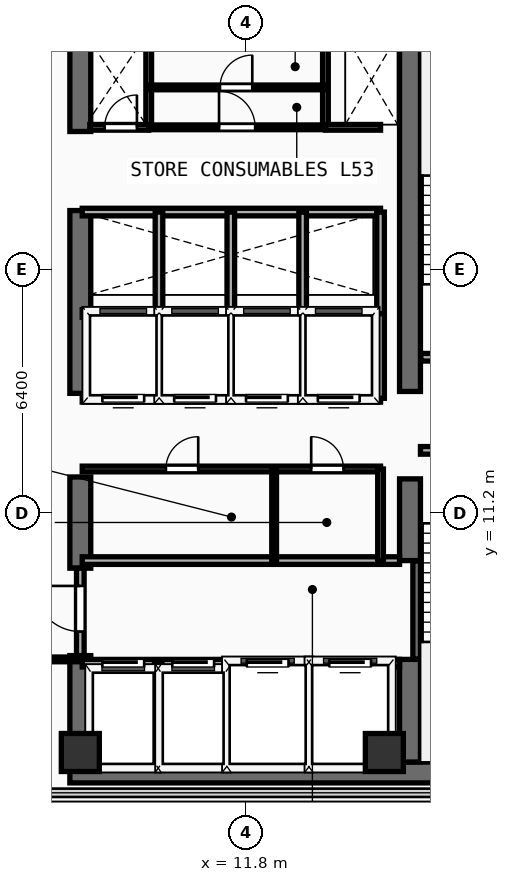
"""IFC4 building model, lengths in metres.
Left out: names, types, materials, properties, quantities, classifications, styles, units other than length and angle.
Written with IfcOpenShell. Run it as: python <this file> out.ifc"""

import sys

from ifc_helpers import new_model, si_unit, direction, frame, frame_2d, origin, origin_2d, place, context, subcontext, project, spatial, rectangle, extrude, element, fill, save


model = new_model("IFC4")
c1 = context("Model", 3, precision=1e-05, world=origin(), true_north=direction((0.0, 1.0)))
c2 = subcontext(c1, "Body", "Model", "MODEL_VIEW")
j1 = project(units=[si_unit("LENGTHUNIT", "METRE"), si_unit("PLANEANGLEUNIT", "RADIAN")], contexts=[c1])
p1 = place(None, origin())
s1 = spatial("IfcSite", under=j1, at=p1, CompositionType="ELEMENT")
p2 = place(p1, origin())
s2 = spatial("IfcBuilding", under=s1, at=p2, CompositionType="ELEMENT")
p3 = place(p2, frame((0.0, 0.0, 208.3)))
s3 = spatial("IfcBuildingStorey", under=s2, at=p3, CompositionType="ELEMENT", Elevation=208.3)
p4 = place(p3, frame((7.175, 4.375, 0.0), z_axis=(0.0, 0.0, 1.0), x_axis=(1.0, 0.0, 0.0)))
e1 = element("IfcWall", 1, at=p4, inside=s3, PredefinedType="SHEAR", context=c2, shape_type="SweptSolid", body=[
    extrude(rectangle(XDim=13.9, YDim=0.55, at=frame_2d((6.95, 0.0))), origin(), (0.0, 0.0, 1.0), 3.56),
])
p5 = place(p3, frame((7.45, 4.65, 0.0), z_axis=(0.0, 0.0, 1.0), x_axis=(0.0, 1.0, 0.0)))
e2 = element("IfcWall", 2, at=p5, inside=s3, PredefinedType="SHEAR", context=c2, shape_type="SweptSolid", body=[
    extrude(rectangle(XDim=2.8, YDim=0.55, at=frame_2d((1.4, 0.0))), origin(), (0.0, 0.0, 1.0), 3.56),
])
p6 = place(p3, frame((7.45, 9.75, 0.0), z_axis=(0.0, 0.0, 1.0), x_axis=(0.0, 1.0, 0.0)))
e3 = element("IfcWall", 3, at=p6, inside=s3, PredefinedType="SHEAR", context=c2, shape_type="SweptSolid", body=[
    extrude(rectangle(XDim=2.4, YDim=0.55, at=frame_2d((1.2, 0.0))), origin(), (0.0, 0.0, 1.0), 3.56),
])
p7 = place(p3, frame((7.45, 14.35, 0.0), z_axis=(0.0, 0.0, 1.0), x_axis=(0.0, 1.0, 0.0)))
e4 = element("IfcWall", 4, at=p7, inside=s3, PredefinedType="SHEAR", context=c2, shape_type="SweptSolid", body=[
    extrude(rectangle(XDim=4.81, YDim=0.55, at=frame_2d((2.405, 0.0))), origin(), (0.0, 0.0, 1.0), 3.56),
])
p8 = place(p3, frame((7.45, 21.24, 0.0), z_axis=(0.0, 0.0, 1.0), x_axis=(0.0, 1.0, 0.0)))
e5 = element("IfcWall", 5, at=p8, inside=s3, PredefinedType="SHEAR", context=c2, shape_type="SweptSolid", body=[
    extrude(rectangle(XDim=2.26, YDim=0.55, at=frame_2d((1.13, 0.0))), origin(), (0.0, 0.0, 1.0), 3.56),
])
p9 = place(p3, frame((16.125, 4.65, 0.0), z_axis=(0.0, 0.0, 1.0), x_axis=(0.0, 1.0, 0.0)))
e6 = element("IfcWall", 6, at=p9, inside=s3, PredefinedType="SHEAR", context=c2, shape_type="SweptSolid", body=[
    extrude(rectangle(XDim=2.7, YDim=0.55, at=frame_2d((1.35, 0.0))), origin(), (0.0, 0.0, 1.0), 3.56),
])
p10 = place(p3, frame((16.125, 9.95, 0.0), z_axis=(0.0, 0.0, 1.0), x_axis=(0.0, 1.0, 0.0)))
e7 = element("IfcWall", 7, at=p10, inside=s3, PredefinedType="SHEAR", context=c2, shape_type="SweptSolid", body=[
    extrude(rectangle(XDim=2.15, YDim=0.55, at=frame_2d((1.075, 0.0))), origin(), (0.0, 0.0, 1.0), 3.56),
])
p11 = place(p3, frame((16.125, 14.4, 0.0), z_axis=(0.0, 0.0, 1.0), x_axis=(0.0, 1.0, 0.0)))
e8 = element("IfcWall", 8, at=p11, inside=s3, PredefinedType="SHEAR", context=c2, shape_type="SweptSolid", body=[
    extrude(rectangle(XDim=9.1, YDim=0.55, at=frame_2d((4.55, 0.0))), origin(), (0.0, 0.0, 1.0), 3.56),
])
for number, where, z_axis, x_axis in (
    (9, (7.45, 4.9, 0.0), (0.0, 0.0, 1.0), (1.0, 0.0, 0.0)),
    (10, (15.45, 4.9, 0.0), (0.0, 0.0, 1.0), (1.0, 0.0, 0.0)),
):
    element("IfcColumn", number, at=place(p3, frame(where, z_axis=z_axis, x_axis=x_axis)), inside=s3, PredefinedType="COLUMN", context=c2, shape_type="SweptSolid", body=[
        extrude(rectangle(XDim=1.0, YDim=1.0, at=origin_2d()), origin(), (0.0, 0.0, 1.0), 3.56),
    ])
p12 = place(p3, frame((16.3, 7.36, 0.0), z_axis=(0.0, 0.0, 1.0), x_axis=(0.0, 1.0, 0.0)))
e11 = element("IfcWall", 11, at=p12, inside=s3, PredefinedType="SHEAR", context=c2, shape_type="SweptSolid", body=[
    extrude(rectangle(XDim=2.58, YDim=0.2, at=frame_2d((1.29, 0.0))), origin(), (0.0, 0.0, 1.0), 3.56),
])
p13 = place(p3, frame((16.4, 12.85, 0.0), z_axis=(0.0, 0.0, 1.0), x_axis=(1.0, 0.0, 0.0)))
e12 = element("IfcWall", 12, at=p13, inside=s3, PredefinedType="PARTITIONING", context=c2, shape_type="SweptSolid", body=[
    extrude(rectangle(XDim=3.96, YDim=0.2, at=frame_2d((1.98, 0.0))), origin(), (0.0, 0.0, 1.0), 3.56),
])
p14 = place(p13, frame((1.304, 0.0, 0.0)))
e13 = element("IfcOpeningElement", 13, at=p14, cuts=e12, PredefinedType="OPENING", context=c2, shape_type="SweptSolid", body=[
    extrude(rectangle(XDim=1.1, YDim=2.2, at=frame_2d((0.55, 1.1))), frame((0.0, 0.11, 0.0), z_axis=(0.0, -1.0, 0.0), x_axis=(1.0, 0.0, 0.0)), (0.0, 0.0, 1.0), 0.22),
])
p15 = place(p3, frame((16.41, 15.3, 0.0), z_axis=(0.0, 0.0, 1.0), x_axis=(1.0, 0.0, 0.0)))
e14 = element("IfcWall", 14, at=p15, inside=s3, PredefinedType="PARTITIONING", context=c2, shape_type="SweptSolid", body=[
    extrude(rectangle(XDim=3.95, YDim=0.2, at=frame_2d((1.975, 0.0))), origin(), (0.0, 0.0, 1.0), 3.56),
])
p16 = place(p15, frame((1.294, 0.0, 0.0)))
e15 = element("IfcOpeningElement", 15, at=p16, cuts=e14, PredefinedType="OPENING", context=c2, shape_type="SweptSolid", body=[
    extrude(rectangle(XDim=1.1, YDim=2.2, at=frame_2d((0.55, 1.1))), frame((0.0, 0.11, 0.0), z_axis=(0.0, -1.0, 0.0), x_axis=(1.0, 0.0, 0.0)), (0.0, 0.0, 1.0), 0.22),
])
p17 = place(p3, frame((7.5, 7.25, 0.0), z_axis=(0.0, 0.0, 1.0), x_axis=(1.0, 0.0, 0.0)))
e16 = element("IfcWall", 16, at=p17, inside=s3, PredefinedType="PARTITIONING", context=c2, shape_type="SweptSolid", body=[
    extrude(rectangle(XDim=8.35, YDim=0.2, at=frame_2d((4.175, 0.0))), origin(), (0.0, 0.0, 1.0), 3.56),
])
p18 = place(p17, frame((0.53, 0.0, 0.0)))
e17 = element("IfcOpeningElement", 17, at=p18, cuts=e16, PredefinedType="OPENING", context=c2, shape_type="SweptSolid", body=[
    extrude(rectangle(XDim=1.1, YDim=2.2, at=frame_2d((0.55, 1.1))), frame((0.0, 0.11, 0.0), z_axis=(0.0, -1.0, 0.0), x_axis=(1.0, 0.0, 0.0)), (0.0, 0.0, 1.0), 0.22),
])
p19 = place(p17, frame((2.37, 0.0, 0.0)))
e18 = element("IfcOpeningElement", 18, at=p19, cuts=e16, PredefinedType="OPENING", context=c2, shape_type="SweptSolid", body=[
    extrude(rectangle(XDim=1.1, YDim=2.2, at=frame_2d((0.55, 1.1))), frame((0.0, 0.11, 0.0), z_axis=(0.0, -1.0, 0.0), x_axis=(1.0, 0.0, 0.0)), (0.0, 0.0, 1.0), 0.22),
])
p20 = place(p17, frame((4.33, 0.0, 0.0)))
e19 = element("IfcOpeningElement", 19, at=p20, cuts=e16, PredefinedType="OPENING", context=c2, shape_type="SweptSolid", body=[
    extrude(rectangle(XDim=1.1, YDim=2.2, at=frame_2d((0.55, 1.1))), frame((0.0, 0.11, 0.0), z_axis=(0.0, -1.0, 0.0), x_axis=(1.0, 0.0, 0.0)), (0.0, 0.0, 1.0), 0.22),
])
p21 = place(p17, frame((6.5, 0.0, 0.0)))
e20 = element("IfcOpeningElement", 20, at=p21, cuts=e16, PredefinedType="OPENING", context=c2, shape_type="SweptSolid", body=[
    extrude(rectangle(XDim=1.1, YDim=2.2, at=frame_2d((0.55, 1.1))), frame((0.0, 0.11, 0.0), z_axis=(0.0, -1.0, 0.0), x_axis=(1.0, 0.0, 0.0)), (0.0, 0.0, 1.0), 0.22),
])
p22 = place(p3, frame((7.5, 9.95, 0.0), z_axis=(0.0, 0.0, 1.0), x_axis=(1.0, 0.0, 0.0)))
e21 = element("IfcWall", 21, at=p22, inside=s3, PredefinedType="PARTITIONING", context=c2, shape_type="SweptSolid", body=[
    extrude(rectangle(XDim=8.35, YDim=0.2, at=frame_2d((4.175, 0.0))), origin(), (0.0, 0.0, 1.0), 3.56),
])
for number, where, z_axis, x_axis in (
    (22, (9.5, 4.45, 0.0), (0.0, 0.0, 1.0), (0.0, 1.0, 0.0)),
    (23, (11.36, 4.45, 0.0), (0.0, 0.0, 1.0), (0.0, 1.0, 0.0)),
    (24, (13.46, 4.45, 0.0), (0.0, 0.0, 1.0), (0.0, 1.0, 0.0)),
):
    element("IfcWall", number, at=place(p3, frame(where, z_axis=z_axis, x_axis=x_axis)), inside=s3, PredefinedType="PARTITIONING", context=c2, shape_type="SweptSolid", body=[
        extrude(rectangle(XDim=2.8, YDim=0.2, at=frame_2d((1.4, 0.0))), origin(), (0.0, 0.0, 1.0), 3.56),
    ])
p23 = place(p3, frame((7.45, 7.45, 0.0), z_axis=(0.0, 0.0, 1.0), x_axis=(0.0, 1.0, 0.0)))
e25 = element("IfcWall", 25, at=p23, inside=s3, PredefinedType="PARTITIONING", context=c2, shape_type="SweptSolid", body=[
    extrude(rectangle(XDim=2.3, YDim=0.2, at=frame_2d((1.15, 0.0))), origin(), (0.0, 0.0, 1.0), 2.54),
])
p24 = place(p23, frame((0.633, 0.0, 0.0)))
e26 = element("IfcOpeningElement", 26, at=p24, cuts=e25, PredefinedType="OPENING", context=c2, shape_type="SweptSolid", body=[
    extrude(rectangle(XDim=1.2, YDim=2.25, at=frame_2d((0.6, 1.125))), frame((0.0, 0.11, 0.0), z_axis=(0.0, -1.0, 0.0), x_axis=(1.0, 0.0, 0.0)), (0.0, 0.0, 1.0), 0.22),
])
p25 = place(p3, frame((7.5, 12.36, 0.0), z_axis=(0.0, 0.0, 1.0), x_axis=(1.0, 0.0, 0.0)))
e27 = element("IfcWall", 27, at=p25, inside=s3, PredefinedType="PARTITIONING", context=c2, shape_type="SweptSolid", body=[
    extrude(rectangle(XDim=7.85, YDim=0.15, at=frame_2d((3.925, 0.0))), origin(), (0.0, 0.0, 1.0), 3.56),
])
p26 = place(p25, frame((2.202, 0.0, 0.0)))
e28 = element("IfcOpeningElement", 28, at=p26, cuts=e27, PredefinedType="OPENING", context=c2, shape_type="SweptSolid", body=[
    extrude(rectangle(XDim=0.85, YDim=2.15, at=frame_2d((0.425, 1.075))), frame((0.0, 0.085, 0.0), z_axis=(0.0, -1.0, 0.0), x_axis=(1.0, 0.0, 0.0)), (0.0, 0.0, 1.0), 0.17),
])
p27 = place(p25, frame((6.025, 0.0, 0.0)))
e29 = element("IfcOpeningElement", 29, at=p27, cuts=e27, PredefinedType="OPENING", context=c2, shape_type="SweptSolid", body=[
    extrude(rectangle(XDim=0.85, YDim=2.15, at=frame_2d((0.425, 1.075))), frame((0.0, 0.085, 0.0), z_axis=(0.0, -1.0, 0.0), x_axis=(1.0, 0.0, 0.0)), (0.0, 0.0, 1.0), 0.17),
])
p28 = place(p3, frame((15.35, 9.95, 0.0), z_axis=(0.0, 0.0, 1.0), x_axis=(0.0, 1.0, 0.0)))
e30 = element("IfcWall", 30, at=p28, inside=s3, PredefinedType="PARTITIONING", context=c2, shape_type="SweptSolid", body=[
    extrude(rectangle(XDim=2.41, YDim=0.15, at=frame_2d((1.205, 0.0))), origin(), (0.0, 0.0, 1.0), 3.56),
])
p29 = place(p3, frame((12.55, 9.95, 0.0), z_axis=(0.0, 0.0, 1.0), x_axis=(0.0, 1.0, 0.0)))
e31 = element("IfcWall", 31, at=p29, inside=s3, PredefinedType="PARTITIONING", context=c2, shape_type="SweptSolid", body=[
    extrude(rectangle(XDim=2.41, YDim=0.125, at=frame_2d((1.205, 0.0))), origin(), (0.0, 0.0, 1.0), 3.56),
])
p30 = place(p3, frame((7.5, 14.22, 0.0), z_axis=(0.0, 0.0, 1.0), x_axis=(1.0, 0.0, 0.0)))
e32 = element("IfcWall", 32, at=p30, inside=s3, PredefinedType="PARTITIONING", context=c2, shape_type="SweptSolid", body=[
    extrude(rectangle(XDim=7.85, YDim=0.2, at=frame_2d((3.925, 0.0))), origin(), (0.0, 0.0, 1.0), 3.56),
])
p31 = place(p30, frame((0.53, 0.0, 0.0)))
e33 = element("IfcOpeningElement", 33, at=p31, cuts=e32, PredefinedType="OPENING", context=c2, shape_type="SweptSolid", body=[
    extrude(rectangle(XDim=1.1, YDim=2.2, at=frame_2d((0.55, 1.1))), frame((0.0, 0.11, 0.0), z_axis=(0.0, -1.0, 0.0), x_axis=(1.0, 0.0, 0.0)), (0.0, 0.0, 1.0), 0.22),
])
p32 = place(p30, frame((2.42, 0.0, 0.0)))
e34 = element("IfcOpeningElement", 34, at=p32, cuts=e32, PredefinedType="OPENING", context=c2, shape_type="SweptSolid", body=[
    extrude(rectangle(XDim=1.1, YDim=2.2, at=frame_2d((0.55, 1.1))), frame((0.0, 0.11, 0.0), z_axis=(0.0, -1.0, 0.0), x_axis=(1.0, 0.0, 0.0)), (0.0, 0.0, 1.0), 0.22),
])
p33 = place(p30, frame((4.31, 0.0, 0.0)))
e35 = element("IfcOpeningElement", 35, at=p33, cuts=e32, PredefinedType="OPENING", context=c2, shape_type="SweptSolid", body=[
    extrude(rectangle(XDim=1.1, YDim=2.2, at=frame_2d((0.55, 1.1))), frame((0.0, 0.11, 0.0), z_axis=(0.0, -1.0, 0.0), x_axis=(1.0, 0.0, 0.0)), (0.0, 0.0, 1.0), 0.22),
])
p34 = place(p30, frame((6.2, 0.0, 0.0)))
e36 = element("IfcOpeningElement", 36, at=p34, cuts=e32, PredefinedType="OPENING", context=c2, shape_type="SweptSolid", body=[
    extrude(rectangle(XDim=1.1, YDim=2.2, at=frame_2d((0.55, 1.1))), frame((0.0, 0.11, 0.0), z_axis=(0.0, -1.0, 0.0), x_axis=(1.0, 0.0, 0.0)), (0.0, 0.0, 1.0), 0.22),
])
p35 = place(p3, frame((7.5, 16.45, 0.0), z_axis=(0.0, 0.0, 1.0), x_axis=(1.0, 0.0, 0.0)))
e37 = element("IfcWall", 37, at=p35, inside=s3, PredefinedType="PARTITIONING", context=c2, shape_type="SweptSolid", body=[
    extrude(rectangle(XDim=7.85, YDim=0.2, at=frame_2d((3.925, 0.0))), origin(), (0.0, 0.0, 1.0), 3.56),
])
for number, where, z_axis, x_axis in (
    (38, (15.35, 14.22, 0.0), (0.0, 0.0, 1.0), (0.0, 1.0, 0.0)),
    (39, (9.52, 14.22, 0.0), (0.0, 0.0, 1.0), (0.0, 1.0, 0.0)),
    (40, (11.41, 14.22, 0.0), (0.0, 0.0, 1.0), (0.0, 1.0, 0.0)),
    (41, (13.3, 14.22, 0.0), (0.0, 0.0, 1.0), (0.0, 1.0, 0.0)),
):
    element("IfcWall", number, at=place(p3, frame(where, z_axis=z_axis, x_axis=x_axis)), inside=s3, PredefinedType="PARTITIONING", context=c2, shape_type="SweptSolid", body=[
        extrude(rectangle(XDim=2.23, YDim=0.2, at=frame_2d((1.115, 0.0))), origin(), (0.0, 0.0, 1.0), 3.56),
    ])
p36 = place(p3, frame((7.5, 19.12, 0.0), z_axis=(0.0, 0.0, 1.0), x_axis=(1.0, 0.0, 0.0)))
e42 = element("IfcWall", 42, at=p36, inside=s3, PredefinedType="PARTITIONING", context=c2, shape_type="SweptSolid", body=[
    extrude(rectangle(XDim=7.85, YDim=0.2, at=frame_2d((3.925, 0.0))), origin(), (0.0, 0.0, 1.0), 3.56),
])
for number, where, z_axis, x_axis in (
    (43, (15.35, 16.45, 0.0), (0.0, 0.0, 1.0), (0.0, 1.0, 0.0)),
    (44, (9.52, 16.45, 0.0), (0.0, 0.0, 1.0), (0.0, 1.0, 0.0)),
    (45, (11.41, 16.45, 0.0), (0.0, 0.0, 1.0), (0.0, 1.0, 0.0)),
    (46, (13.3, 16.45, 0.0), (0.0, 0.0, 1.0), (0.0, 1.0, 0.0)),
):
    element("IfcWall", number, at=place(p3, frame(where, z_axis=z_axis, x_axis=x_axis)), inside=s3, PredefinedType="PARTITIONING", context=c2, shape_type="SweptSolid", body=[
        extrude(rectangle(XDim=2.67, YDim=0.2, at=frame_2d((1.335, 0.0))), origin(), (0.0, 0.0, 1.0), 3.56),
    ])
for number, where, z_axis, x_axis in (
    (47, (9.25, 21.35, 0.0), (0.0, 0.0, 1.0), (0.0, 1.0, 0.0)),
    (48, (13.9, 21.35, 0.0), (0.0, 0.0, 1.0), (0.0, 1.0, 0.0)),
):
    element("IfcWall", number, at=place(p3, frame(where, z_axis=z_axis, x_axis=x_axis)), inside=s3, PredefinedType="PARTITIONING", context=c2, shape_type="SweptSolid", body=[
        extrude(rectangle(XDim=2.13, YDim=0.15, at=frame_2d((1.065, 0.0))), origin(), (0.0, 0.0, 1.0), 3.56),
    ])
p37 = place(p3, frame((7.7, 21.35, 0.0), z_axis=(0.0, 0.0, 1.0), x_axis=(1.0, 0.0, 0.0)))
e49 = element("IfcWall", 49, at=p37, inside=s3, PredefinedType="PARTITIONING", context=c2, shape_type="SweptSolid", body=[
    extrude(rectangle(XDim=1.55, YDim=0.15, at=frame_2d((0.775, 0.0))), origin(), (0.0, 0.0, 1.0), 3.56),
])
p38 = place(p37, frame((0.39, 0.0, 0.0)))
e50 = element("IfcOpeningElement", 50, at=p38, cuts=e49, PredefinedType="OPENING", context=c2, shape_type="SweptSolid", body=[
    extrude(rectangle(XDim=0.85, YDim=2.15, at=frame_2d((0.425, 1.075))), frame((0.0, 0.085, 0.0), z_axis=(0.0, -1.0, 0.0), x_axis=(1.0, 0.0, 0.0)), (0.0, 0.0, 1.0), 0.17),
])
p39 = place(p3, frame((13.9, 21.35, 0.0), z_axis=(0.0, 0.0, 1.0), x_axis=(1.0, 0.0, 0.0)))
e51 = element("IfcWall", 51, at=p39, inside=s3, PredefinedType="PARTITIONING", context=c2, shape_type="SweptSolid", body=[
    extrude(rectangle(XDim=1.45, YDim=0.15, at=frame_2d((0.725, 0.0))), origin(), (0.0, 0.0, 1.0), 3.56),
])
p40 = place(p3, frame((9.25, 21.35, 0.0), z_axis=(0.0, 0.0, 1.0), x_axis=(1.0, 0.0, 0.0)))
e52 = element("IfcWall", 52, at=p40, inside=s3, PredefinedType="PARTITIONING", context=c2, shape_type="SweptSolid", body=[
    extrude(rectangle(XDim=4.65, YDim=0.125, at=frame_2d((2.325, 0.0))), origin(), (0.0, 0.0, 1.0), 3.56),
])
p41 = place(p40, frame((1.85, 0.0, 0.0)))
e53 = element("IfcOpeningElement", 53, at=p41, cuts=e52, PredefinedType="OPENING", context=c2, shape_type="SweptSolid", body=[
    extrude(rectangle(XDim=0.95, YDim=2.15, at=frame_2d((0.475, 1.075))), frame((0.0, 0.073, 0.0), z_axis=(0.0, -1.0, 0.0), x_axis=(1.0, 0.0, 0.0)), (0.0, 0.0, 1.0), 0.145),
])
p42 = place(p3, frame((9.25, 22.4, 0.0), z_axis=(0.0, 0.0, 1.0), x_axis=(1.0, 0.0, 0.0)))
e54 = element("IfcWall", 54, at=p42, inside=s3, PredefinedType="PARTITIONING", context=c2, shape_type="SweptSolid", body=[
    extrude(rectangle(XDim=4.65, YDim=0.125, at=frame_2d((2.325, 0.0))), origin(), (0.0, 0.0, 1.0), 3.56),
])
p43 = place(p42, frame((1.875, 0.0, 0.0)))
e55 = element("IfcOpeningElement", 55, at=p43, cuts=e54, PredefinedType="OPENING", context=c2, shape_type="SweptSolid", body=[
    extrude(rectangle(XDim=0.85, YDim=2.15, at=frame_2d((0.425, 1.075))), frame((0.0, 0.073, 0.0), z_axis=(0.0, -1.0, 0.0), x_axis=(1.0, 0.0, 0.0)), (0.0, 0.0, 1.0), 0.145),
])
p44 = place(p3, frame((4.04, 7.35, 0.0), z_axis=(0.0, 0.0, 1.0), x_axis=(1.0, 0.0, 0.0)))
e56 = element("IfcWall", 56, at=p44, inside=s3, PredefinedType="PARTITIONING", context=c2, shape_type="SweptSolid", body=[
    extrude(rectangle(XDim=3.36, YDim=0.125, at=frame_2d((1.68, 0.0))), origin(), (0.0, 0.0, 1.0), 3.56),
])
p45 = place(p44, frame((1.687, 0.0, 0.0)))
e57 = element("IfcOpeningElement", 57, at=p45, cuts=e56, PredefinedType="OPENING", context=c2, shape_type="SweptSolid", body=[
    extrude(rectangle(XDim=0.85, YDim=2.15, at=frame_2d((0.425, 1.075))), frame((0.0, 0.073, 0.0), z_axis=(0.0, -1.0, 0.0), x_axis=(1.0, 0.0, 0.0)), (0.0, 0.0, 1.0), 0.145),
])
p46 = place(p18, origin())
e58 = element("IfcDoor", 58, at=p46, inside=s3, OperationType="SLIDING_TO_LEFT", PredefinedType="DOOR", context=c2, shape_type="SweptSolid", body=[
    extrude(rectangle(XDim=1.1, YDim=2.2, at=frame_2d((0.55, 1.1))), frame((0.0, 0.025, 0.0), z_axis=(0.0, -1.0, 0.0), x_axis=(1.0, 0.0, 0.0)), (0.0, 0.0, 1.0), 0.05),
])
fill(e17, e58)
p47 = place(p19, origin())
e59 = element("IfcDoor", 59, at=p47, inside=s3, OperationType="SLIDING_TO_LEFT", PredefinedType="DOOR", context=c2, shape_type="SweptSolid", body=[
    extrude(rectangle(XDim=1.1, YDim=2.2, at=frame_2d((0.55, 1.1))), frame((0.0, 0.025, 0.0), z_axis=(0.0, -1.0, 0.0), x_axis=(1.0, 0.0, 0.0)), (0.0, 0.0, 1.0), 0.05),
])
fill(e18, e59)
p48 = place(p20, origin())
e60 = element("IfcDoor", 60, at=p48, inside=s3, OperationType="SLIDING_TO_LEFT", PredefinedType="DOOR", context=c2, shape_type="SweptSolid", body=[
    extrude(rectangle(XDim=1.1, YDim=2.2, at=frame_2d((0.55, 1.1))), frame((0.0, 0.025, 0.0), z_axis=(0.0, -1.0, 0.0), x_axis=(1.0, 0.0, 0.0)), (0.0, 0.0, 1.0), 0.05),
])
fill(e19, e60)
p49 = place(p21, origin())
e61 = element("IfcDoor", 61, at=p49, inside=s3, OperationType="SLIDING_TO_LEFT", PredefinedType="DOOR", context=c2, shape_type="SweptSolid", body=[
    extrude(rectangle(XDim=1.1, YDim=2.2, at=frame_2d((0.55, 1.1))), frame((0.0, 0.025, 0.0), z_axis=(0.0, -1.0, 0.0), x_axis=(1.0, 0.0, 0.0)), (0.0, 0.0, 1.0), 0.05),
])
fill(e20, e61)
p50 = place(p24, frame((1.2, 0.0, 0.0), z_axis=(0.0, 0.0, 1.0), x_axis=(-1.0, 0.0, 0.0)))
e62 = element("IfcDoor", 62, at=p50, inside=s3, OperationType="SINGLE_SWING_LEFT", PredefinedType="DOOR", context=c2, shape_type="SweptSolid", body=[
    extrude(rectangle(XDim=1.2, YDim=2.25, at=frame_2d((0.6, 1.125))), frame((0.0, 0.025, 0.0), z_axis=(0.0, -1.0, 0.0), x_axis=(1.0, 0.0, 0.0)), (0.0, 0.0, 1.0), 0.05),
])
fill(e26, e62)
p51 = place(p26, origin())
e63 = element("IfcDoor", 63, at=p51, inside=s3, OperationType="SINGLE_SWING_RIGHT", PredefinedType="DOOR", context=c2, shape_type="SweptSolid", body=[
    extrude(rectangle(XDim=0.85, YDim=2.15, at=frame_2d((0.425, 1.075))), frame((0.0, 0.025, 0.0), z_axis=(0.0, -1.0, 0.0), x_axis=(1.0, 0.0, 0.0)), (0.0, 0.0, 1.0), 0.05),
])
fill(e28, e63)
p52 = place(p27, origin())
e64 = element("IfcDoor", 64, at=p52, inside=s3, OperationType="SINGLE_SWING_LEFT", PredefinedType="DOOR", context=c2, shape_type="SweptSolid", body=[
    extrude(rectangle(XDim=0.85, YDim=2.15, at=frame_2d((0.425, 1.075))), frame((0.0, 0.025, 0.0), z_axis=(0.0, -1.0, 0.0), x_axis=(1.0, 0.0, 0.0)), (0.0, 0.0, 1.0), 0.05),
])
fill(e29, e64)
p53 = place(p31, frame((1.1, 0.0, 0.0), z_axis=(0.0, 0.0, 1.0), x_axis=(-1.0, 0.0, 0.0)))
e65 = element("IfcDoor", 65, at=p53, inside=s3, OperationType="SLIDING_TO_LEFT", PredefinedType="DOOR", context=c2, shape_type="SweptSolid", body=[
    extrude(rectangle(XDim=1.1, YDim=2.2, at=frame_2d((0.55, 1.1))), frame((0.0, 0.025, 0.0), z_axis=(0.0, -1.0, 0.0), x_axis=(1.0, 0.0, 0.0)), (0.0, 0.0, 1.0), 0.05),
])
fill(e33, e65)
p54 = place(p32, frame((1.1, 0.0, 0.0), z_axis=(0.0, 0.0, 1.0), x_axis=(-1.0, 0.0, 0.0)))
e66 = element("IfcDoor", 66, at=p54, inside=s3, OperationType="SLIDING_TO_LEFT", PredefinedType="DOOR", context=c2, shape_type="SweptSolid", body=[
    extrude(rectangle(XDim=1.1, YDim=2.2, at=frame_2d((0.55, 1.1))), frame((0.0, 0.025, 0.0), z_axis=(0.0, -1.0, 0.0), x_axis=(1.0, 0.0, 0.0)), (0.0, 0.0, 1.0), 0.05),
])
fill(e34, e66)
p55 = place(p33, frame((1.1, 0.0, 0.0), z_axis=(0.0, 0.0, 1.0), x_axis=(-1.0, 0.0, 0.0)))
e67 = element("IfcDoor", 67, at=p55, inside=s3, OperationType="SLIDING_TO_LEFT", PredefinedType="DOOR", context=c2, shape_type="SweptSolid", body=[
    extrude(rectangle(XDim=1.1, YDim=2.2, at=frame_2d((0.55, 1.1))), frame((0.0, 0.025, 0.0), z_axis=(0.0, -1.0, 0.0), x_axis=(1.0, 0.0, 0.0)), (0.0, 0.0, 1.0), 0.05),
])
fill(e35, e67)
p56 = place(p34, frame((1.1, 0.0, 0.0), z_axis=(0.0, 0.0, 1.0), x_axis=(-1.0, 0.0, 0.0)))
e68 = element("IfcDoor", 68, at=p56, inside=s3, OperationType="SLIDING_TO_LEFT", PredefinedType="DOOR", context=c2, shape_type="SweptSolid", body=[
    extrude(rectangle(XDim=1.1, YDim=2.2, at=frame_2d((0.55, 1.1))), frame((0.0, 0.025, 0.0), z_axis=(0.0, -1.0, 0.0), x_axis=(1.0, 0.0, 0.0)), (0.0, 0.0, 1.0), 0.05),
])
fill(e36, e68)
p57 = place(p38, origin())
e69 = element("IfcDoor", 69, at=p57, inside=s3, OperationType="SINGLE_SWING_RIGHT", PredefinedType="DOOR", context=c2, shape_type="SweptSolid", body=[
    extrude(rectangle(XDim=0.85, YDim=2.15, at=frame_2d((0.425, 1.075))), frame((0.0, 0.025, 0.0), z_axis=(0.0, -1.0, 0.0), x_axis=(1.0, 0.0, 0.0)), (0.0, 0.0, 1.0), 0.05),
])
fill(e50, e69)
p58 = place(p41, origin())
e70 = element("IfcDoor", 70, at=p58, inside=s3, OperationType="SINGLE_SWING_LEFT", PredefinedType="DOOR", context=c2, shape_type="SweptSolid", body=[
    extrude(rectangle(XDim=0.95, YDim=2.15, at=frame_2d((0.475, 1.075))), frame((0.0, 0.025, 0.0), z_axis=(0.0, -1.0, 0.0), x_axis=(1.0, 0.0, 0.0)), (0.0, 0.0, 1.0), 0.05),
])
fill(e53, e70)
p59 = place(p43, origin())
e71 = element("IfcDoor", 71, at=p59, inside=s3, OperationType="SINGLE_SWING_RIGHT", PredefinedType="DOOR", context=c2, shape_type="SweptSolid", body=[
    extrude(rectangle(XDim=0.85, YDim=2.15, at=frame_2d((0.425, 1.075))), frame((0.0, 0.025, 0.0), z_axis=(0.0, -1.0, 0.0), x_axis=(1.0, 0.0, 0.0)), (0.0, 0.0, 1.0), 0.05),
])
fill(e55, e71)
save(model, sys.argv[1])
